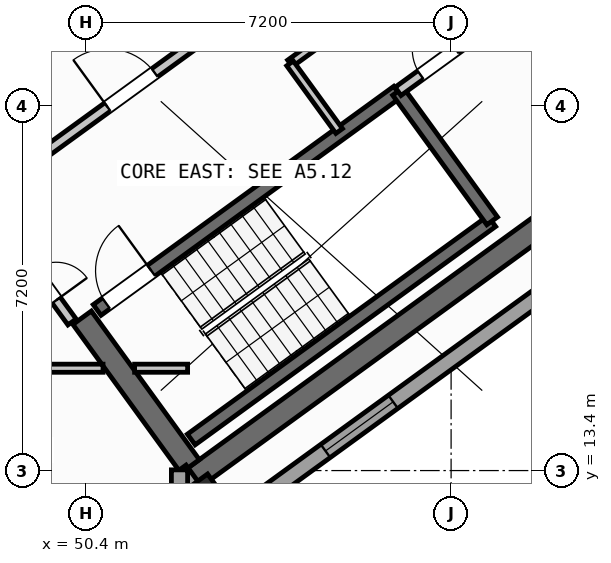
"""IFC4 building model, lengths in metres.
Left out: names, types, materials, properties, quantities, classifications, styles, units other than length and angle.
Written with IfcOpenShell. Run it as: python <this file> out.ifc"""

import sys

from ifc_helpers import new_model, si_unit, direction, frame, frame_2d, origin, origin_2d, place, context, subcontext, project, spatial, rectangle, hollow_rectangle, extrude, source, transform, mapped, element, fill, save


model = new_model("IFC4")
c1 = context("Model", 3, precision=1e-05, world=origin(), true_north=direction((0.0, 1.0)))
c2 = subcontext(c1, "Body", "Model", "MODEL_VIEW")
j1 = project(units=[si_unit("LENGTHUNIT", "METRE"), si_unit("PLANEANGLEUNIT", "RADIAN")], contexts=[c1])
p1 = place(None, origin())
s1 = spatial("IfcSite", under=j1, at=p1, CompositionType="ELEMENT")
p2 = place(p1, origin())
s2 = spatial("IfcBuilding", under=s1, at=p2, CompositionType="ELEMENT")
p3 = place(p2, frame((0.0, 0.0, 207.6)))
s3 = spatial("IfcBuildingStorey", under=s2, at=p3, CompositionType="ELEMENT", Elevation=207.6)
p4 = place(p3, frame((52.399, 13.169, 0.0), z_axis=(0.0, 0.0, 1.0), x_axis=(0.809022352778, 0.587777877013, 0.0)))
e1 = element("IfcWall", 1, at=p4, inside=s3, PredefinedType="SHEAR", context=c2, shape_type="SweptSolid", body=[
    extrude(rectangle(XDim=12.24, YDim=0.45, at=frame_2d((6.12, 0.0))), origin(), (0.0, 0.0, 1.0), 3.35),
])
p5 = place(p3, frame((52.449, 13.483, 0.0), z_axis=(0.0, 0.0, 1.0), x_axis=(-0.587819244441, 0.808992296542, 0.0)))
e2 = element("IfcWall", 2, at=p5, inside=s3, PredefinedType="SHEAR", context=c2, shape_type="SweptSolid", body=[
    extrude(rectangle(XDim=3.625, YDim=0.45, at=frame_2d((1.812, 0.0))), origin(), (0.0, 0.0, 1.0), 3.35),
])
m1 = source(origin(), c2, "Body", "SweptSolid", [
    extrude(hollow_rectangle(XDim=0.8, YDim=0.8, WallThickness=0.032, at=origin_2d()), origin(), (0.0, 0.0, 1.0), 3.6),
])
p6 = place(p3, frame((52.705, 12.773, 0.0), z_axis=(0.0, 0.0, 1.0), x_axis=(0.809016994375, 0.587785252292, 0.0)))
e3 = element("IfcColumn", 3, at=p6, inside=s3, PredefinedType="COLUMN", context=c2, shape_type="MappedRepresentation", body=[
    mapped(m1, transform((0.0, 0.0, 0.0), scale=1.0)),
])
p7 = place(p3, frame((67.454, 22.747, 0.0), z_axis=(0.0, 0.0, 1.0), x_axis=(-0.809021120468, -0.587779573171, 0.0)))
e4 = element("IfcWall", 4, at=p7, inside=s3, PredefinedType="STANDARD", context=c2, shape_type="SweptSolid", body=[
    extrude(rectangle(XDim=17.588, YDim=0.32, at=frame_2d((8.794, 0.0))), origin(), (0.0, 0.0, 1.0), 3.35),
])
p8 = place(p7, frame((1.624, 0.0, 0.0)))
e5 = element("IfcOpeningElement", 5, at=p8, cuts=e4, PredefinedType="OPENING", context=c2, shape_type="SweptSolid", body=[
    extrude(rectangle(XDim=1.05, YDim=2.15, at=frame_2d((0.525, 1.075))), frame((0.0, 0.17, 0.0), z_axis=(0.0, -1.0, 0.0), x_axis=(1.0, 0.0, 0.0)), (0.0, 0.0, 1.0), 0.34),
])
p9 = place(p7, frame((8.344, 0.0, 0.9)))
e6 = element("IfcOpeningElement", 6, at=p9, cuts=e4, PredefinedType="OPENING", context=c2, shape_type="SweptSolid", body=[
    extrude(rectangle(XDim=1.65, YDim=1.45, at=frame_2d((0.825, 0.725))), frame((0.0, 0.17, 0.0), z_axis=(0.0, -1.0, 0.0), x_axis=(1.0, 0.0, 0.0)), (0.0, 0.0, 1.0), 0.34),
])
p10 = place(p7, frame((13.594, 0.0, 0.9)))
e7 = element("IfcOpeningElement", 7, at=p10, cuts=e4, PredefinedType="OPENING", context=c2, shape_type="SweptSolid", body=[
    extrude(rectangle(XDim=1.65, YDim=1.45, at=frame_2d((0.825, 0.725))), frame((0.0, 0.17, 0.0), z_axis=(0.0, -1.0, 0.0), x_axis=(1.0, 0.0, 0.0)), (0.0, 0.0, 1.0), 0.34),
])
p11 = place(p3, frame((52.937, 12.455, 0.0), z_axis=(0.0, 0.0, 1.0), x_axis=(-0.587706324018, 0.809074333241, 0.0)))
e8 = element("IfcWall", 8, at=p11, inside=s3, PredefinedType="STANDARD", context=c2, shape_type="SweptSolid", body=[
    extrude(rectangle(XDim=1.186, YDim=0.32, at=frame_2d((0.593, 0.0))), origin(), (0.0, 0.0, 1.0), 3.35),
])
p12 = place(p3, frame((52.24, 13.414, 0.0), z_axis=(0.0, 0.0, 1.0), x_axis=(0.0, -1.0, 0.0)))
e9 = element("IfcWall", 9, at=p12, inside=s3, PredefinedType="STANDARD", context=c2, shape_type="SweptSolid", body=[
    extrude(rectangle(XDim=9.948, YDim=0.32, at=frame_2d((4.974, 0.0))), origin(), (0.0, 0.0, 1.0), 3.35),
])
p13 = place(p12, frame((3.287, 0.0, 0.9)))
e10 = element("IfcOpeningElement", 10, at=p13, cuts=e9, PredefinedType="OPENING", context=c2, shape_type="SweptSolid", body=[
    extrude(rectangle(XDim=1.65, YDim=1.45, at=frame_2d((0.825, 0.725))), frame((0.0, 0.17, 0.0), z_axis=(0.0, -1.0, 0.0), x_axis=(1.0, 0.0, 0.0)), (0.0, 0.0, 1.0), 0.34),
])
p14 = place(p12, frame((7.808, 0.0, 0.9)))
e11 = element("IfcOpeningElement", 11, at=p14, cuts=e9, PredefinedType="OPENING", context=c2, shape_type="SweptSolid", body=[
    extrude(rectangle(XDim=1.35, YDim=1.45, at=frame_2d((0.675, 0.725))), frame((0.0, 0.17, 0.0), z_axis=(0.0, -1.0, 0.0), x_axis=(1.0, 0.0, 0.0)), (0.0, 0.0, 1.0), 0.34),
])
p15 = place(p3, frame((52.472, 14.013, 0.0), z_axis=(0.0, 0.0, 1.0), x_axis=(0.809028366311, 0.587769599847, 0.0)))
e12 = element("IfcWall", 12, at=p15, inside=s3, PredefinedType="SHEAR", context=c2, shape_type="SweptSolid", body=[
    extrude(rectangle(XDim=7.33, YDim=0.26, at=frame_2d((3.665, 0.0))), origin(), (0.0, 0.0, 1.0), 3.35),
])
p16 = place(p3, frame((50.615, 16.57, 0.0), z_axis=(0.0, 0.0, 1.0), x_axis=(0.809028366311, 0.587769599847, 0.0)))
e13 = element("IfcWall", 13, at=p16, inside=s3, PredefinedType="SHEAR", context=c2, shape_type="SweptSolid", body=[
    extrude(rectangle(XDim=7.33, YDim=0.26, at=frame_2d((3.665, 0.0))), origin(), (0.0, 0.0, 1.0), 3.35),
])
p17 = place(p16, frame((0.22, 0.0, 0.0)))
e14 = element("IfcOpeningElement", 14, at=p17, cuts=e13, PredefinedType="OPENING", context=c2, shape_type="SweptSolid", body=[
    extrude(rectangle(XDim=1.1, YDim=2.1, at=frame_2d((0.55, 1.05))), frame((0.0, 0.14, 0.0), z_axis=(0.0, -1.0, 0.0), x_axis=(1.0, 0.0, 0.0)), (0.0, 0.0, 1.0), 0.28),
])
p18 = place(p3, frame((58.41, 18.327, 0.0), z_axis=(0.0, 0.0, 1.0), x_axis=(-0.58776738483, 0.809029975545, 0.0)))
e15 = element("IfcWall", 15, at=p18, inside=s3, PredefinedType="SHEAR", context=c2, shape_type="SweptSolid", body=[
    extrude(rectangle(XDim=3.16, YDim=0.26, at=frame_2d((1.58, 0.0))), origin(), (0.0, 0.0, 1.0), 3.35),
])
p19 = place(p3, frame((47.025, 21.378, 0.0), z_axis=(0.0, 0.0, 1.0), x_axis=(0.809052869724, 0.587735870941, 0.0)))
e16 = element("IfcWall", 16, at=p19, inside=s3, PredefinedType="STANDARD", context=c2, shape_type="SweptSolid", body=[
    extrude(rectangle(XDim=3.498, YDim=0.2, at=frame_2d((1.749, 0.0))), origin(), (0.0, 0.0, 1.0), 3.34),
])
p20 = place(p19, frame((0.508, 0.0, 0.0)))
e17 = element("IfcOpeningElement", 17, at=p20, cuts=e16, PredefinedType="OPENING", context=c2, shape_type="SweptSolid", body=[
    extrude(rectangle(XDim=1.3, YDim=2.2, at=frame_2d((0.65, 1.1))), frame((0.0, 0.11, 0.0), z_axis=(0.0, -1.0, 0.0), x_axis=(1.0, 0.0, 0.0)), (0.0, 0.0, 1.0), 0.22),
])
p21 = place(p3, frame((48.718, 19.048, 0.0), z_axis=(0.0, 0.0, 1.0), x_axis=(0.809017261719, 0.587784884325, 0.0)))
e18 = element("IfcWall", 18, at=p21, inside=s3, PredefinedType="STANDARD", context=c2, shape_type="SweptSolid", body=[
    extrude(rectangle(XDim=5.818, YDim=0.2, at=frame_2d((2.909, 0.0))), origin(), (0.0, 0.0, 1.0), 3.34),
])
p22 = place(p21, frame((2.598, 0.0, 0.0)))
e19 = element("IfcOpeningElement", 19, at=p22, cuts=e18, PredefinedType="OPENING", context=c2, shape_type="SweptSolid", body=[
    extrude(rectangle(XDim=1.15, YDim=2.1, at=frame_2d((0.575, 1.05))), frame((0.0, 0.11, 0.0), z_axis=(0.0, -1.0, 0.0), x_axis=(1.0, 0.0, 0.0)), (0.0, 0.0, 1.0), 0.22),
])
p23 = place(p3, frame((56.553, 20.884, 0.0), z_axis=(0.0, 0.0, 1.0), x_axis=(0.809041669066, 0.587751288995, 0.0)))
e20 = element("IfcWall", 20, at=p23, inside=s3, PredefinedType="STANDARD", context=c2, shape_type="SweptSolid", body=[
    extrude(rectangle(XDim=3.868, YDim=0.2, at=frame_2d((1.934, 0.0))), origin(), (0.0, 0.0, 1.0), 3.34),
])
p24 = place(p23, frame((0.55, 0.0, 0.0)))
e21 = element("IfcOpeningElement", 21, at=p24, cuts=e20, PredefinedType="OPENING", context=c2, shape_type="SweptSolid", body=[
    extrude(rectangle(XDim=0.86, YDim=2.05, at=frame_2d((0.43, 1.025))), frame((0.0, 0.11, 0.0), z_axis=(0.0, -1.0, 0.0), x_axis=(1.0, 0.0, 0.0)), (0.0, 0.0, 1.0), 0.22),
])
p25 = place(p3, frame((54.421, 21.436, 0.0), z_axis=(0.0, 0.0, 1.0), x_axis=(0.809013710463, 0.587789772183, 0.0)))
e22 = element("IfcWall", 22, at=p25, inside=s3, PredefinedType="PARTITIONING", context=c2, shape_type="SweptSolid", body=[
    extrude(rectangle(XDim=5.36, YDim=0.16, at=frame_2d((2.68, 0.0))), origin(), (0.0, 0.0, 1.0), 3.34),
])
p26 = place(p25, frame((1.4, 0.0, 0.0)))
e23 = element("IfcOpeningElement", 23, at=p26, cuts=e22, PredefinedType="OPENING", context=c2, shape_type="SweptSolid", body=[
    extrude(rectangle(XDim=0.86, YDim=2.05, at=frame_2d((0.43, 1.025))), frame((0.0, 0.09, 0.0), z_axis=(0.0, -1.0, 0.0), x_axis=(1.0, 0.0, 0.0)), (0.0, 0.0, 1.0), 0.18),
])
p27 = place(p3, frame((55.391, 20.102, 0.0), z_axis=(0.0, 0.0, 1.0), x_axis=(-0.58778447739, 0.809017557374, 0.0)))
e24 = element("IfcWall", 24, at=p27, inside=s3, PredefinedType="PARTITIONING", context=c2, shape_type="SweptSolid", body=[
    extrude(rectangle(XDim=1.65, YDim=0.16, at=frame_2d((0.825, 0.0))), origin(), (0.0, 0.0, 1.0), 3.34),
])
p28 = place(p3, frame((35.178, 15.42, 0.0), z_axis=(0.0, 0.0, 1.0), x_axis=(1.0, 0.0, 0.0)))
e25 = element("IfcWall", 25, at=p28, inside=s3, PredefinedType="PARTITIONING", context=c2, shape_type="SweptSolid", body=[
    extrude(rectangle(XDim=15.552, YDim=0.16, at=frame_2d((7.776, 0.0))), origin(), (0.0, 0.0, 1.0), 3.34),
])
p29 = place(p28, frame((3.885, 0.0, 0.0)))
e26 = element("IfcOpeningElement", 26, at=p29, cuts=e25, PredefinedType="OPENING", context=c2, shape_type="SweptSolid", body=[
    extrude(rectangle(XDim=1.0, YDim=2.1, at=frame_2d((0.5, 1.05))), frame((0.0, 0.09, 0.0), z_axis=(0.0, -1.0, 0.0), x_axis=(1.0, 0.0, 0.0)), (0.0, 0.0, 1.0), 0.18),
])
p30 = place(p3, frame((51.354, 15.42, 0.0), z_axis=(0.0, 0.0, 1.0), x_axis=(1.0, 0.0, 0.0)))
e27 = element("IfcWall", 27, at=p30, inside=s3, PredefinedType="PARTITIONING", context=c2, shape_type="SweptSolid", body=[
    extrude(rectangle(XDim=1.046, YDim=0.16, at=frame_2d((0.523, 0.0))), origin(), (0.0, 0.0, 1.0), 3.34),
])
p31 = place(p3, frame((50.119, 16.333, 0.0), z_axis=(0.0, 0.0, 1.0), x_axis=(-0.587749856981, 0.809042709391, 0.0)))
e28 = element("IfcWall", 28, at=p31, inside=s3, PredefinedType="STANDARD", context=c2, shape_type="SweptSolid", body=[
    extrude(rectangle(XDim=2.96, YDim=0.2, at=frame_2d((1.48, 0.0))), origin(), (0.0, 0.0, 1.0), 3.34),
])
p32 = place(p31, frame((0.53, 0.0, 0.0)))
e29 = element("IfcOpeningElement", 29, at=p32, cuts=e28, PredefinedType="OPENING", context=c2, shape_type="SweptSolid", body=[
    extrude(rectangle(XDim=1.5, YDim=2.15, at=frame_2d((0.75, 1.075))), frame((0.0, 0.11, 0.0), z_axis=(0.0, -1.0, 0.0), x_axis=(1.0, 0.0, 0.0)), (0.0, 0.0, 1.0), 0.22),
])
m2 = source(origin(), c2, "Body", "SweptSolid", [
    extrude(rectangle(XDim=1.65, YDim=1.45, at=frame_2d((0.825, 0.725))), frame((0.0, 0.03, 0.0), z_axis=(0.0, -1.0, 0.0), x_axis=(1.0, 0.0, 0.0)), (0.0, 0.0, 1.0), 0.06),
])
p33 = place(p10, origin())
e30 = element("IfcWindow", 30, at=p33, inside=s3, PartitioningType="SINGLE_PANEL", PredefinedType="WINDOW", context=c2, shape_type="MappedRepresentation", body=[
    mapped(m2, transform((0.0, 0.0, 0.0), scale=1.0)),
])
fill(e7, e30)
m3 = source(origin(), c2, "Body", "SweptSolid", [
    extrude(rectangle(XDim=1.1, YDim=2.1, at=frame_2d((0.55, 1.05))), frame((0.0, 0.025, 0.0), z_axis=(0.0, -1.0, 0.0), x_axis=(1.0, 0.0, 0.0)), (0.0, 0.0, 1.0), 0.05),
])
p34 = place(p17, origin())
e31 = element("IfcDoor", 31, at=p34, inside=s3, OperationType="SINGLE_SWING_RIGHT", PredefinedType="DOOR", context=c2, shape_type="MappedRepresentation", body=[
    mapped(m3, transform((0.0, 0.0, 0.0), scale=1.0)),
])
fill(e14, e31)
m4 = source(origin(), c2, "Body", "SweptSolid", [
    extrude(rectangle(XDim=1.15, YDim=2.1, at=frame_2d((0.575, 1.05))), frame((0.0, 0.025, 0.0), z_axis=(0.0, -1.0, 0.0), x_axis=(1.0, 0.0, 0.0)), (0.0, 0.0, 1.0), 0.05),
])
p35 = place(p22, origin())
e32 = element("IfcDoor", 32, at=p35, inside=s3, OperationType="SINGLE_SWING_LEFT", PredefinedType="DOOR", context=c2, shape_type="MappedRepresentation", body=[
    mapped(m4, transform((0.0, 0.0, 0.0), scale=1.0)),
])
fill(e19, e32)
m5 = source(origin(), c2, "Body", "SweptSolid", [
    extrude(rectangle(XDim=0.86, YDim=2.05, at=frame_2d((0.43, 1.025))), frame((0.0, 0.025, 0.0), z_axis=(0.0, -1.0, 0.0), x_axis=(1.0, 0.0, 0.0)), (0.0, 0.0, 1.0), 0.05),
])
p36 = place(p24, origin())
e33 = element("IfcDoor", 33, at=p36, inside=s3, OperationType="SINGLE_SWING_RIGHT", PredefinedType="DOOR", context=c2, shape_type="MappedRepresentation", body=[
    mapped(m5, transform((0.0, 0.0, 0.0), scale=1.0)),
])
fill(e21, e33)
m6 = source(origin(), c2, "Body", "SweptSolid", [
    extrude(rectangle(XDim=1.5, YDim=2.15, at=frame_2d((0.75, 1.075))), frame((0.0, 0.025, 0.0), z_axis=(0.0, -1.0, 0.0), x_axis=(1.0, 0.0, 0.0)), (0.0, 0.0, 1.0), 0.05),
])
p37 = place(p32, frame((1.5, 0.0, 0.0), z_axis=(0.0, 0.0, 1.0), x_axis=(-1.0, 0.0, 0.0)))
e34 = element("IfcDoor", 34, at=p37, inside=s3, OperationType="DOUBLE_DOOR_SINGLE_SWING", PredefinedType="DOOR", context=c2, shape_type="MappedRepresentation", body=[
    mapped(m6, transform((0.0, 0.0, 0.0), scale=1.0)),
])
fill(e29, e34)
save(model, sys.argv[1])
